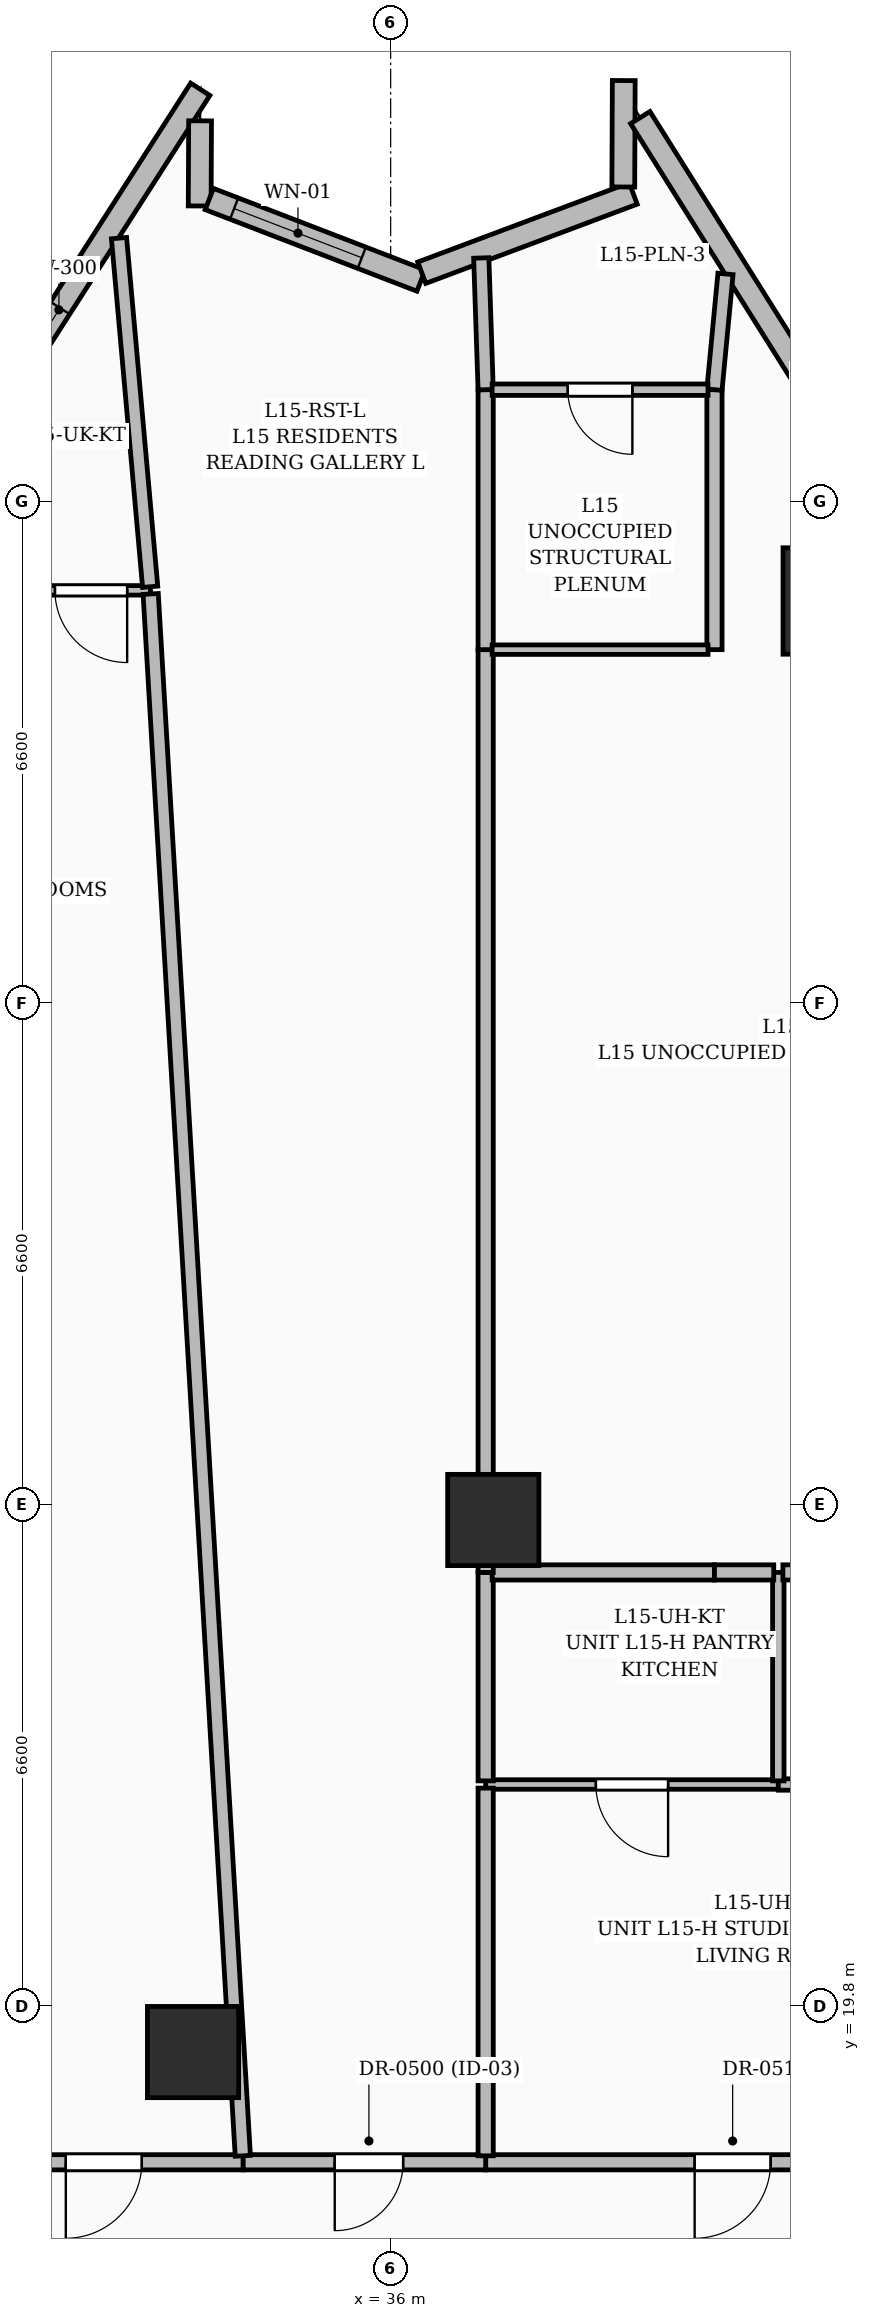
"""IFC4 building model, lengths in metres.
Left out: names, types, materials, properties, quantities, classifications, styles, units other than length and angle.
Written with IfcOpenShell. Run it as: python <this file> out.ifc"""

import sys

from ifc_helpers import new_model, si_unit, direction, frame, frame_2d, origin, origin_2d, place, context, subcontext, project, spatial, rectangle, extrude, element, fill, save


model = new_model("IFC4")
c1 = context("Model", 3, precision=1e-05, world=origin(), true_north=direction((0.0, 1.0)))
c2 = subcontext(c1, "Body", "Model", "MODEL_VIEW")
j1 = project(units=[si_unit("LENGTHUNIT", "METRE"), si_unit("PLANEANGLEUNIT", "RADIAN")], contexts=[c1])
p1 = place(None, origin())
s1 = spatial("IfcSite", under=j1, at=p1, CompositionType="ELEMENT")
p2 = place(p1, origin())
s2 = spatial("IfcBuilding", under=s1, at=p2, CompositionType="ELEMENT")
p3 = place(p2, frame((0.0, 0.0, 64.2)))
s3 = spatial("IfcBuildingStorey", under=s2, at=p3, CompositionType="ELEMENT", Elevation=64.2)
for number, where, z_axis, x_axis in (
    (1, (37.35, 26.2, 0.0), (0.0, 0.0, 1.0), (1.0, 0.0, 0.0)),
    (2, (33.4, 19.2, 0.0), (0.0, 0.0, 1.0), (1.0, 0.0, 0.0)),
):
    element("IfcColumn", number, at=place(p3, frame(where, z_axis=z_axis, x_axis=x_axis)), inside=s3, PredefinedType="COLUMN", context=c2, shape_type="SweptSolid", body=[
        extrude(rectangle(XDim=1.2, YDim=1.2, at=origin_2d()), origin(), (0.0, 0.0, 1.0), 3.6),
    ])
p4 = place(p3, frame((41.862, 38.29, 0.0), z_axis=(0.0, 0.0, 1.0), x_axis=(1.0, 0.0, 0.0)))
e3 = element("IfcColumn", 3, at=p4, inside=s3, PredefinedType="COLUMN", context=c2, shape_type="SweptSolid", body=[
    extrude(rectangle(XDim=1.4, YDim=1.4, at=origin_2d()), origin(), (0.0, 0.0, 1.0), 3.6),
])
p5 = place(p3, frame((29.776, 39.219, 0.0), z_axis=(0.0, 0.0, 1.0), x_axis=(0.539570203146, 0.841940613035, 0.0)))
e4 = element("IfcWall", 4, at=p5, inside=s3, PredefinedType="SOLIDWALL", context=c2, shape_type="SweptSolid", body=[
    extrude(rectangle(XDim=6.893, YDim=0.3, at=frame_2d((3.447, 0.0))), origin(), (0.0, 0.0, 1.0), 3.35),
])
p6 = place(p5, frame((1.075, 0.0, 0.6)))
e5 = element("IfcOpeningElement", 5, at=p6, cuts=e4, PredefinedType="OPENING", context=c2, shape_type="SweptSolid", body=[
    extrude(rectangle(XDim=2.4, YDim=2.1, at=frame_2d((1.2, 1.05))), frame((0.0, 0.16, 0.0), z_axis=(0.0, -1.0, 0.0), x_axis=(1.0, 0.0, 0.0)), (0.0, 0.0, 1.0), 0.32),
])
p7 = place(p3, frame((33.493, 44.607, 0.0), z_axis=(0.0, 0.0, 1.0), x_axis=(-0.00501410745, -0.999987429284, 0.0)))
e6 = element("IfcWall", 6, at=p7, inside=s3, PredefinedType="SOLIDWALL", context=c2, shape_type="SweptSolid", body=[
    extrude(rectangle(XDim=1.12, YDim=0.3, at=frame_2d((0.56, 0.0))), origin(), (0.0, 0.0, 1.0), 3.35),
])
p8 = place(p3, frame((33.614, 43.579, 0.0), z_axis=(0.0, 0.0, 1.0), x_axis=(0.933166321884, -0.359444871576, 0.0)))
e7 = element("IfcWall", 7, at=p8, inside=s3, PredefinedType="SOLIDWALL", context=c2, shape_type="SweptSolid", body=[
    extrude(rectangle(XDim=2.985, YDim=0.3, at=frame_2d((1.493, 0.0))), origin(), (0.0, 0.0, 1.0), 3.35),
])
p9 = place(p8, frame((0.35, 0.0, 0.6)))
e8 = element("IfcOpeningElement", 8, at=p9, cuts=e7, PredefinedType="OPENING", context=c2, shape_type="SweptSolid", body=[
    extrude(rectangle(XDim=1.8, YDim=2.1, at=frame_2d((0.9, 1.05))), frame((0.0, 0.16, 0.0), z_axis=(0.0, -1.0, 0.0), x_axis=(1.0, 0.0, 0.0)), (0.0, 0.0, 1.0), 0.32),
])
p10 = place(p3, frame((36.409, 42.609, 0.0), z_axis=(0.0, 0.0, 1.0), x_axis=(0.936403459864, 0.350925291699, 0.0)))
e9 = element("IfcWall", 9, at=p10, inside=s3, PredefinedType="SOLIDWALL", context=c2, shape_type="SweptSolid", body=[
    extrude(rectangle(XDim=2.971, YDim=0.3, at=frame_2d((1.485, 0.0))), origin(), (0.0, 0.0, 1.0), 3.35),
])
p11 = place(p3, frame((39.061, 43.737, 0.0), z_axis=(0.0, 0.0, 1.0), x_axis=(0.004359916705, 0.999990495518, 0.0)))
e10 = element("IfcWall", 10, at=p11, inside=s3, PredefinedType="SOLIDWALL", context=c2, shape_type="SweptSolid", body=[
    extrude(rectangle(XDim=1.4, YDim=0.3, at=frame_2d((0.7, 0.0))), origin(), (0.0, 0.0, 1.0), 3.35),
])
p12 = place(p3, frame((39.284, 44.65, 0.0), z_axis=(0.0, 0.0, 1.0), x_axis=(0.531931524323, -0.846787372031, 0.0)))
e11 = element("IfcWall", 11, at=p12, inside=s3, PredefinedType="SOLIDWALL", context=c2, shape_type="SweptSolid", body=[
    extrude(rectangle(XDim=6.604, YDim=0.3, at=frame_2d((3.302, 0.0))), origin(), (0.0, 0.0, 1.0), 3.35),
])
p13 = place(p12, frame((4.0, 0.0, 0.8)))
e12 = element("IfcOpeningElement", 12, at=p13, cuts=e11, PredefinedType="OPENING", context=c2, shape_type="SweptSolid", body=[
    extrude(rectangle(XDim=1.2, YDim=1.8, at=frame_2d((0.6, 0.9))), frame((0.0, 0.16, 0.0), z_axis=(0.0, -1.0, 0.0), x_axis=(1.0, 0.0, 0.0)), (0.0, 0.0, 1.0), 0.32),
])
p14 = place(p3, frame((43.63, 17.75, 0.0), z_axis=(0.0, 0.0, 1.0), x_axis=(-1.0, 0.0, 0.0)))
e13 = element("IfcWall", 13, at=p14, inside=s3, PredefinedType="PARTITIONING", context=c2, shape_type="SweptSolid", body=[
    extrude(rectangle(XDim=6.38, YDim=0.2, at=frame_2d((3.19, 0.0))), origin(), (0.0, 0.0, 1.0), 3.35),
])
p15 = place(p14, frame((2.631, 0.0, 0.0)))
e14 = element("IfcOpeningElement", 14, at=p15, cuts=e13, PredefinedType="OPENING", context=c2, shape_type="SweptSolid", body=[
    extrude(rectangle(XDim=1.0, YDim=2.2, at=frame_2d((0.5, 1.1))), frame((0.0, 0.11, 0.0), z_axis=(0.0, -1.0, 0.0), x_axis=(1.0, 0.0, 0.0)), (0.0, 0.0, 1.0), 0.22),
])
p16 = place(p3, frame((34.06, 17.75, 0.0), z_axis=(0.0, 0.0, 1.0), x_axis=(-1.0, 0.0, 0.0)))
e15 = element("IfcWall", 15, at=p16, inside=s3, PredefinedType="PARTITIONING", context=c2, shape_type="SweptSolid", body=[
    extrude(rectangle(XDim=3.19, YDim=0.2, at=frame_2d((1.595, 0.0))), origin(), (0.0, 0.0, 1.0), 2.309),
])
p17 = place(p16, frame((1.334, 0.0, 0.0)))
e16 = element("IfcOpeningElement", 16, at=p17, cuts=e15, PredefinedType="OPENING", context=c2, shape_type="SweptSolid", body=[
    extrude(rectangle(XDim=1.0, YDim=2.2, at=frame_2d((0.5, 1.1))), frame((0.0, 0.11, 0.0), z_axis=(0.0, -1.0, 0.0), x_axis=(1.0, 0.0, 0.0)), (0.0, 0.0, 1.0), 0.22),
])
p18 = place(p3, frame((37.25, 17.75, 0.0), z_axis=(0.0, 0.0, 1.0), x_axis=(-1.0, 0.0, 0.0)))
e17 = element("IfcWall", 17, at=p18, inside=s3, PredefinedType="PARTITIONING", context=c2, shape_type="SweptSolid", body=[
    extrude(rectangle(XDim=3.19, YDim=0.2, at=frame_2d((1.595, 0.0))), origin(), (0.0, 0.0, 1.0), 2.309),
])
p19 = place(p18, frame((1.086, 0.0, 0.0)))
e18 = element("IfcOpeningElement", 18, at=p19, cuts=e17, PredefinedType="OPENING", context=c2, shape_type="SweptSolid", body=[
    extrude(rectangle(XDim=0.9, YDim=2.1, at=frame_2d((0.45, 1.05))), frame((0.0, 0.11, 0.0), z_axis=(0.0, -1.0, 0.0), x_axis=(1.0, 0.0, 0.0)), (0.0, 0.0, 1.0), 0.22),
])
p20 = place(p3, frame((41.1, 22.72, 0.0), z_axis=(0.0, 0.0, 1.0), x_axis=(-1.0, 0.0, 0.0)))
e19 = element("IfcWall", 19, at=p20, inside=s3, PredefinedType="PARTITIONING", context=c2, shape_type="SweptSolid", body=[
    extrude(rectangle(XDim=3.85, YDim=0.125, at=frame_2d((1.925, 0.0))), origin(), (0.0, 0.0, 1.0), 3.35),
])
p21 = place(p20, frame((1.45, 0.0, 0.0)))
e20 = element("IfcOpeningElement", 20, at=p21, cuts=e19, PredefinedType="OPENING", context=c2, shape_type="SweptSolid", body=[
    extrude(rectangle(XDim=0.95, YDim=2.2, at=frame_2d((0.475, 1.1))), frame((0.0, 0.072, 0.0), z_axis=(0.0, -1.0, 0.0), x_axis=(1.0, 0.0, 0.0)), (0.0, 0.0, 1.0), 0.145),
])
p22 = place(p3, frame((44.48, 22.72, 0.0), z_axis=(0.0, 0.0, 1.0), x_axis=(-1.0, 0.0, 0.0)))
e21 = element("IfcWall", 21, at=p22, inside=s3, PredefinedType="PARTITIONING", context=c2, shape_type="SweptSolid", body=[
    extrude(rectangle(XDim=3.38, YDim=0.15, at=frame_2d((1.69, 0.0))), origin(), (0.0, 0.0, 1.0), 2.309),
])
p23 = place(p22, frame((1.206, 0.0, 0.0)))
e22 = element("IfcOpeningElement", 22, at=p23, cuts=e21, PredefinedType="OPENING", context=c2, shape_type="SweptSolid", body=[
    extrude(rectangle(XDim=0.85, YDim=2.1, at=frame_2d((0.425, 1.05))), frame((0.0, 0.085, 0.0), z_axis=(0.0, -1.0, 0.0), x_axis=(1.0, 0.0, 0.0)), (0.0, 0.0, 1.0), 0.17),
])
p24 = place(p3, frame((37.25, 22.673, 0.0), z_axis=(0.0, 0.0, 1.0), x_axis=(0.0, -1.0, 0.0)))
e23 = element("IfcWall", 23, at=p24, inside=s3, PredefinedType="PARTITIONING", context=c2, shape_type="SweptSolid", body=[
    extrude(rectangle(XDim=4.838, YDim=0.2, at=frame_2d((2.419, 0.0))), origin(), (0.0, 0.0, 1.0), 3.35),
])
p25 = place(p3, frame((41.1, 22.768, 0.0), z_axis=(0.0, 0.0, 1.0), x_axis=(0.0, 1.0, 0.0)))
e24 = element("IfcWall", 24, at=p25, inside=s3, PredefinedType="PARTITIONING", context=c2, shape_type="SweptSolid", body=[
    extrude(rectangle(XDim=2.742, YDim=0.15, at=frame_2d((1.371, 0.0))), origin(), (0.0, 0.0, 1.0), 3.35),
])
p26 = place(p3, frame((37.25, 25.51, 0.0), z_axis=(0.0, 0.0, 1.0), x_axis=(0.0, -1.0, 0.0)))
e25 = element("IfcWall", 25, at=p26, inside=s3, PredefinedType="PARTITIONING", context=c2, shape_type="SweptSolid", body=[
    extrude(rectangle(XDim=2.742, YDim=0.2, at=frame_2d((1.371, 0.0))), origin(), (0.0, 0.0, 1.0), 2.309),
])
p27 = place(p3, frame((40.26, 25.51, 0.0), z_axis=(0.0, 0.0, 1.0), x_axis=(-1.0, 0.0, 0.0)))
e26 = element("IfcWall", 26, at=p27, inside=s3, PredefinedType="PARTITIONING", context=c2, shape_type="SweptSolid", body=[
    extrude(rectangle(XDim=2.925, YDim=0.2, at=frame_2d((1.462, 0.0))), origin(), (0.0, 0.0, 1.0), 3.35),
])
p28 = place(p3, frame((43.14, 25.51, 0.0), z_axis=(0.0, 0.0, 1.0), x_axis=(-1.0, 0.0, 0.0)))
e27 = element("IfcWall", 27, at=p28, inside=s3, PredefinedType="PARTITIONING", context=c2, shape_type="SweptSolid", body=[
    extrude(rectangle(XDim=1.98, YDim=0.2, at=frame_2d((0.99, 0.0))), origin(), (0.0, 0.0, 1.0), 2.309),
])
p29 = place(p3, frame((32.84, 38.43, 0.0), z_axis=(0.0, 0.0, 1.0), x_axis=(-1.0, 0.0, 0.0)))
e28 = element("IfcWall", 28, at=p29, inside=s3, PredefinedType="PARTITIONING", context=c2, shape_type="SweptSolid", body=[
    extrude(rectangle(XDim=1.48, YDim=0.125, at=frame_2d((0.74, 0.0))), origin(), (0.0, 0.0, 1.0), 2.37),
])
p30 = place(p29, frame((0.307, 0.0, 0.0)))
e29 = element("IfcOpeningElement", 29, at=p30, cuts=e28, PredefinedType="OPENING", context=c2, shape_type="SweptSolid", body=[
    extrude(rectangle(XDim=0.95, YDim=2.2, at=frame_2d((0.475, 1.1))), frame((0.0, 0.072, 0.0), z_axis=(0.0, -1.0, 0.0), x_axis=(1.0, 0.0, 0.0)), (0.0, 0.0, 1.0), 0.145),
])
p31 = place(p3, frame((34.055, 17.835, 0.0), z_axis=(0.0, 0.0, 1.0), x_axis=(-0.058890284917, 0.998264461124, 0.0)))
e30 = element("IfcWall", 30, at=p31, inside=s3, PredefinedType="PARTITIONING", context=c2, shape_type="SweptSolid", body=[
    extrude(rectangle(XDim=20.583, YDim=0.2, at=frame_2d((10.292, 0.0))), origin(), (0.0, 0.0, 1.0), 2.279),
])
p32 = place(p3, frame((32.836, 38.477, 0.0), z_axis=(0.0, 0.0, 1.0), x_axis=(-0.08906812694, 0.9960255362, 0.0)))
e31 = element("IfcWall", 31, at=p32, inside=s3, PredefinedType="PARTITIONING", context=c2, shape_type="SweptSolid", body=[
    extrude(rectangle(XDim=4.605, YDim=0.2, at=frame_2d((2.302, 0.0))), origin(), (0.0, 0.0, 1.0), 2.37),
])
p33 = place(p3, frame((37.25, 25.51, 0.0), z_axis=(0.0, 0.0, 1.0), x_axis=(0.0, 1.0, 0.0)))
e32 = element("IfcWall", 32, at=p33, inside=s3, PredefinedType="PARTITIONING", context=c2, shape_type="SweptSolid", body=[
    extrude(rectangle(XDim=12.14, YDim=0.2, at=frame_2d((6.07, 0.0))), origin(), (0.0, 0.0, 1.0), 2.279),
])
p34 = place(p3, frame((37.25, 37.65, 0.0), z_axis=(0.0, 0.0, 1.0), x_axis=(0.0, 1.0, 0.0)))
e33 = element("IfcWall", 33, at=p34, inside=s3, PredefinedType="PARTITIONING", context=c2, shape_type="SweptSolid", body=[
    extrude(rectangle(XDim=3.42, YDim=0.2, at=frame_2d((1.71, 0.0))), origin(), (0.0, 0.0, 1.0), 2.37),
])
p35 = place(p3, frame((37.25, 41.07, 0.0), z_axis=(0.0, 0.0, 1.0), x_axis=(-0.033511738673, 0.999438323946, 0.0)))
e34 = element("IfcWall", 34, at=p35, inside=s3, PredefinedType="PARTITIONING", context=c2, shape_type="SweptSolid", body=[
    extrude(rectangle(XDim=1.734, YDim=0.2, at=frame_2d((0.867, 0.0))), origin(), (0.0, 0.0, 1.0), 3.35),
])
p36 = place(p3, frame((40.26, 41.07, 0.0), z_axis=(0.0, 0.0, 1.0), x_axis=(0.0, -1.0, 0.0)))
e35 = element("IfcWall", 35, at=p36, inside=s3, PredefinedType="PARTITIONING", context=c2, shape_type="SweptSolid", body=[
    extrude(rectangle(XDim=3.42, YDim=0.2, at=frame_2d((1.71, 0.0))), origin(), (0.0, 0.0, 1.0), 2.37),
])
p37 = place(p3, frame((40.405, 42.593, 0.0), z_axis=(0.0, 0.0, 1.0), x_axis=(-0.094794030576, -0.99549690696, 0.0)))
e36 = element("IfcWall", 36, at=p37, inside=s3, PredefinedType="PARTITIONING", context=c2, shape_type="SweptSolid", body=[
    extrude(rectangle(XDim=1.53, YDim=0.2, at=frame_2d((0.765, 0.0))), origin(), (0.0, 0.0, 1.0), 3.35),
])
p38 = place(p3, frame((40.175, 37.65, 0.0), z_axis=(0.0, 0.0, 1.0), x_axis=(-1.0, 0.0, 0.0)))
e37 = element("IfcWall", 37, at=p38, inside=s3, PredefinedType="PARTITIONING", context=c2, shape_type="SweptSolid", body=[
    extrude(rectangle(XDim=2.84, YDim=0.125, at=frame_2d((1.42, 0.0))), origin(), (0.0, 0.0, 1.0), 3.35),
])
p39 = place(p3, frame((40.175, 41.07, 0.0), z_axis=(0.0, 0.0, 1.0), x_axis=(-1.0, 0.0, 0.0)))
e38 = element("IfcWall", 38, at=p39, inside=s3, PredefinedType="PARTITIONING", context=c2, shape_type="SweptSolid", body=[
    extrude(rectangle(XDim=2.84, YDim=0.15, at=frame_2d((1.42, 0.0))), origin(), (0.0, 0.0, 1.0), 3.35),
])
p40 = place(p39, frame((0.995, 0.0, 0.0)))
e39 = element("IfcOpeningElement", 39, at=p40, cuts=e38, PredefinedType="OPENING", context=c2, shape_type="SweptSolid", body=[
    extrude(rectangle(XDim=0.85, YDim=2.1, at=frame_2d((0.425, 1.05))), frame((0.0, 0.085, 0.0), z_axis=(0.0, -1.0, 0.0), x_axis=(1.0, 0.0, 0.0)), (0.0, 0.0, 1.0), 0.17),
])
p41 = place(p3, frame((41.04, 25.51, 0.0), z_axis=(0.0, 0.0, 1.0), x_axis=(-1.0, 0.0, 0.0)))
e40 = element("IfcWall", 40, at=p41, inside=s3, PredefinedType="PARTITIONING", context=c2, shape_type="SweptSolid", body=[
    extrude(rectangle(XDim=0.78, YDim=0.2, at=frame_2d((0.39, 0.0))), origin(), (0.0, 0.0, 1.0), 3.35),
])
p42 = place(p6, origin())
e41 = element("IfcWindow", 41, at=p42, inside=s3, PartitioningType="SINGLE_PANEL", PredefinedType="WINDOW", context=c2, shape_type="SweptSolid", body=[
    extrude(rectangle(XDim=2.4, YDim=2.1, at=frame_2d((1.2, 1.05))), frame((0.0, 0.03, 0.0), z_axis=(0.0, -1.0, 0.0), x_axis=(1.0, 0.0, 0.0)), (0.0, 0.0, 1.0), 0.06),
])
fill(e5, e41)
p43 = place(p9, origin())
e42 = element("IfcWindow", 42, at=p43, inside=s3, PartitioningType="SINGLE_PANEL", PredefinedType="WINDOW", context=c2, shape_type="SweptSolid", body=[
    extrude(rectangle(XDim=1.8, YDim=2.1, at=frame_2d((0.9, 1.05))), frame((0.0, 0.03, 0.0), z_axis=(0.0, -1.0, 0.0), x_axis=(1.0, 0.0, 0.0)), (0.0, 0.0, 1.0), 0.06),
])
fill(e8, e42)
p44 = place(p19, origin())
e43 = element("IfcDoor", 43, at=p44, inside=s3, OperationType="SINGLE_SWING_RIGHT", PredefinedType="DOOR", context=c2, shape_type="SweptSolid", body=[
    extrude(rectangle(XDim=0.9, YDim=2.1, at=frame_2d((0.45, 1.05))), frame((0.0, 0.025, 0.0), z_axis=(0.0, -1.0, 0.0), x_axis=(1.0, 0.0, 0.0)), (0.0, 0.0, 1.0), 0.05),
])
fill(e18, e43)
p45 = place(p15, origin())
e44 = element("IfcDoor", 44, at=p45, inside=s3, OperationType="SINGLE_SWING_RIGHT", PredefinedType="DOOR", context=c2, shape_type="SweptSolid", body=[
    extrude(rectangle(XDim=1.0, YDim=2.2, at=frame_2d((0.5, 1.1))), frame((0.0, 0.025, 0.0), z_axis=(0.0, -1.0, 0.0), x_axis=(1.0, 0.0, 0.0)), (0.0, 0.0, 1.0), 0.05),
])
fill(e14, e44)
p46 = place(p21, origin())
e45 = element("IfcDoor", 45, at=p46, inside=s3, OperationType="SINGLE_SWING_LEFT", PredefinedType="DOOR", context=c2, shape_type="SweptSolid", body=[
    extrude(rectangle(XDim=0.95, YDim=2.2, at=frame_2d((0.475, 1.1))), frame((0.0, 0.025, 0.0), z_axis=(0.0, -1.0, 0.0), x_axis=(1.0, 0.0, 0.0)), (0.0, 0.0, 1.0), 0.05),
])
fill(e20, e45)
p47 = place(p17, origin())
e46 = element("IfcDoor", 46, at=p47, inside=s3, OperationType="SINGLE_SWING_RIGHT", PredefinedType="DOOR", context=c2, shape_type="SweptSolid", body=[
    extrude(rectangle(XDim=1.0, YDim=2.2, at=frame_2d((0.5, 1.1))), frame((0.0, 0.025, 0.0), z_axis=(0.0, -1.0, 0.0), x_axis=(1.0, 0.0, 0.0)), (0.0, 0.0, 1.0), 0.05),
])
fill(e16, e46)
p48 = place(p30, origin())
e47 = element("IfcDoor", 47, at=p48, inside=s3, OperationType="SINGLE_SWING_LEFT", PredefinedType="DOOR", context=c2, shape_type="SweptSolid", body=[
    extrude(rectangle(XDim=0.95, YDim=2.2, at=frame_2d((0.475, 1.1))), frame((0.0, 0.025, 0.0), z_axis=(0.0, -1.0, 0.0), x_axis=(1.0, 0.0, 0.0)), (0.0, 0.0, 1.0), 0.05),
])
fill(e29, e47)
p49 = place(p40, origin())
e48 = element("IfcDoor", 48, at=p49, inside=s3, OperationType="SINGLE_SWING_LEFT", PredefinedType="DOOR", context=c2, shape_type="SweptSolid", body=[
    extrude(rectangle(XDim=0.85, YDim=2.1, at=frame_2d((0.425, 1.05))), frame((0.0, 0.025, 0.0), z_axis=(0.0, -1.0, 0.0), x_axis=(1.0, 0.0, 0.0)), (0.0, 0.0, 1.0), 0.05),
])
fill(e39, e48)
save(model, sys.argv[1])
